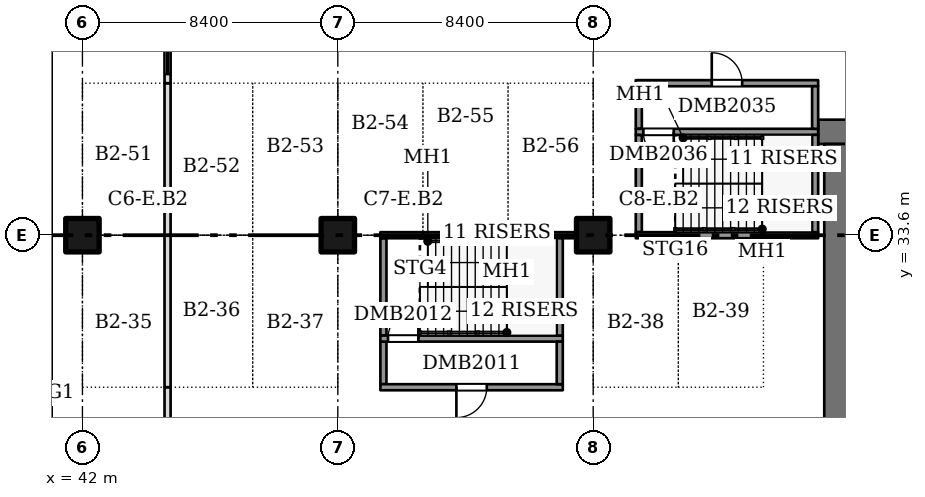
"""IFC4 building model, lengths in metres.
Left out: names, types, materials, properties, quantities, classifications, styles, units other than length and angle.
Written with IfcOpenShell. Run it as: python <this file> out.ifc"""

import sys

from ifc_helpers import new_model, si_unit, direction, frame, frame_2d, origin, origin_2d, place, context, subcontext, project, spatial, rectangle, extrude, element, fill, save


model = new_model("IFC4")
c1 = context("Model", 3, precision=1e-05, world=origin(), true_north=direction((0.0, 1.0)))
c2 = subcontext(c1, "Body", "Model", "MODEL_VIEW")
j1 = project(units=[si_unit("LENGTHUNIT", "METRE"), si_unit("PLANEANGLEUNIT", "RADIAN")], contexts=[c1])
p1 = place(None, origin())
s1 = spatial("IfcSite", under=j1, at=p1, CompositionType="ELEMENT")
p2 = place(p1, origin())
s2 = spatial("IfcBuilding", under=s1, at=p2, CompositionType="ELEMENT")
p3 = place(p2, frame((0.0, 0.0, -8.0)))
s3 = spatial("IfcBuildingStorey", under=s2, at=p3, CompositionType="ELEMENT", Elevation=-8.0)
p4 = place(p3, frame((66.2, 37.0, 0.0), z_axis=(0.0, 0.0, 1.0), x_axis=(1.0, 0.0, 0.0)))
e1 = element("IfcWall", 1, at=p4, inside=s3, PredefinedType="SOLIDWALL", context=c2, shape_type="SweptSolid", body=[
    extrude(rectangle(XDim=60.2, YDim=0.8, at=frame_2d((30.1, 0.0))), origin(), (0.0, 0.0, 1.0), 3.7),
])
p5 = place(p3, frame((66.8, 0.4, 0.0), z_axis=(0.0, 0.0, 1.0), x_axis=(0.0, 1.0, 0.0)))
e2 = element("IfcWall", 2, at=p5, inside=s3, PredefinedType="SOLIDWALL", context=c2, shape_type="SweptSolid", body=[
    extrude(rectangle(XDim=36.2, YDim=0.8, at=frame_2d((18.1, 0.0))), origin(), (0.0, 0.0, 1.0), 3.7),
])
for number, where, z_axis, x_axis in (
    (3, (42.0, 33.6, 0.0), (0.0, 0.0, 1.0), (1.0, 0.0, 0.0)),
    (4, (50.4, 33.6, 0.0), (0.0, 0.0, 1.0), (1.0, 0.0, 0.0)),
    (5, (58.8, 33.6, 0.0), (0.0, 0.0, 1.0), (1.0, 0.0, 0.0)),
):
    element("IfcColumn", number, at=place(p3, frame(where, z_axis=z_axis, x_axis=x_axis)), inside=s3, PredefinedType="COLUMN", context=c2, shape_type="SweptSolid", body=[
        extrude(rectangle(XDim=1.1, YDim=1.1, at=origin_2d()), origin(), (0.0, 0.0, 1.0), 3.7),
    ])
p6 = place(p3, frame((51.9, 28.7, 0.0), z_axis=(0.0, 0.0, 1.0), x_axis=(0.0, 1.0, 0.0)))
e6 = element("IfcWall", 6, at=p6, inside=s3, PredefinedType="SOLIDWALL", context=c2, shape_type="SweptSolid", body=[
    extrude(rectangle(XDim=1.4, YDim=0.2, at=frame_2d((0.7, 0.0))), origin(), (0.0, 0.0, 1.0), 3.7),
])
p7 = place(p3, frame((51.8, 28.6, 0.0), z_axis=(0.0, 0.0, 1.0), x_axis=(1.0, 0.0, 0.0)))
e7 = element("IfcWall", 7, at=p7, inside=s3, PredefinedType="SOLIDWALL", context=c2, shape_type="SweptSolid", body=[
    extrude(rectangle(XDim=6.0, YDim=0.2, at=frame_2d((3.0, 0.0))), origin(), (0.0, 0.0, 1.0), 3.7),
])
p8 = place(p7, frame((2.5, 0.0, 0.0)))
e8 = element("IfcOpeningElement", 8, at=p8, cuts=e7, PredefinedType="OPENING", context=c2, shape_type="SweptSolid", body=[
    extrude(rectangle(XDim=1.0, YDim=2.1, at=frame_2d((0.5, 1.05))), frame((0.0, 0.11, 0.0), z_axis=(0.0, -1.0, 0.0), x_axis=(1.0, 0.0, 0.0)), (0.0, 0.0, 1.0), 0.22),
])
p9 = place(p3, frame((51.9, 30.3, 0.0), z_axis=(0.0, 0.0, 1.0), x_axis=(0.0, 1.0, 0.0)))
e9 = element("IfcWall", 9, at=p9, inside=s3, PredefinedType="SOLIDWALL", context=c2, shape_type="SweptSolid", body=[
    extrude(rectangle(XDim=3.2, YDim=0.2, at=frame_2d((1.6, 0.0))), origin(), (0.0, 0.0, 1.0), 3.7),
])
p10 = place(p3, frame((51.8, 30.2, 0.0), z_axis=(0.0, 0.0, 1.0), x_axis=(1.0, 0.0, 0.0)))
e10 = element("IfcWall", 10, at=p10, inside=s3, PredefinedType="SOLIDWALL", context=c2, shape_type="SweptSolid", body=[
    extrude(rectangle(XDim=6.0, YDim=0.2, at=frame_2d((3.0, 0.0))), origin(), (0.0, 0.0, 1.0), 3.7),
])
p11 = place(p10, frame((0.25, 0.0, 0.0)))
e11 = element("IfcOpeningElement", 11, at=p11, cuts=e10, PredefinedType="OPENING", context=c2, shape_type="SweptSolid", body=[
    extrude(rectangle(XDim=1.0, YDim=2.1, at=frame_2d((0.5, 1.05))), frame((0.0, 0.11, 0.0), z_axis=(0.0, -1.0, 0.0), x_axis=(1.0, 0.0, 0.0)), (0.0, 0.0, 1.0), 0.22),
])
p12 = place(p3, frame((51.8, 33.6, 0.0), z_axis=(0.0, 0.0, 1.0), x_axis=(1.0, 0.0, 0.0)))
e12 = element("IfcWall", 12, at=p12, inside=s3, PredefinedType="SOLIDWALL", context=c2, shape_type="SweptSolid", body=[
    extrude(rectangle(XDim=1.4, YDim=0.2, at=frame_2d((0.7, 0.0))), origin(), (0.0, 0.0, 1.0), 3.7),
])
p13 = place(p3, frame((53.2, 33.6, 0.0), z_axis=(0.0, 0.0, 1.0), x_axis=(1.0, 0.0, 0.0)))
e13 = element("IfcWall", 13, at=p13, inside=s3, PredefinedType="SOLIDWALL", context=c2, shape_type="SweptSolid", body=[
    extrude(rectangle(XDim=2.8, YDim=0.2, at=frame_2d((1.4, 0.0))), origin(), (0.0, 0.0, 1.0), 3.7),
])
p14 = place(p3, frame((56.0, 33.6, 0.0), z_axis=(0.0, 0.0, 1.0), x_axis=(1.0, 0.0, 0.0)))
e14 = element("IfcWall", 14, at=p14, inside=s3, PredefinedType="SOLIDWALL", context=c2, shape_type="SweptSolid", body=[
    extrude(rectangle(XDim=2.25, YDim=0.2, at=frame_2d((1.125, 0.0))), origin(), (0.0, 0.0, 1.0), 3.7),
])
p15 = place(p3, frame((57.7, 28.7, 0.0), z_axis=(0.0, 0.0, 1.0), x_axis=(0.0, 1.0, 0.0)))
e15 = element("IfcWall", 15, at=p15, inside=s3, PredefinedType="SOLIDWALL", context=c2, shape_type="SweptSolid", body=[
    extrude(rectangle(XDim=1.4, YDim=0.2, at=frame_2d((0.7, 0.0))), origin(), (0.0, 0.0, 1.0), 3.7),
])
for number, where, z_axis, x_axis in (
    (16, (57.7, 30.3, 0.0), (0.0, 0.0, 1.0), (0.0, 1.0, 0.0)),
    (17, (60.3, 33.7, 0.0), (0.0, 0.0, 1.0), (0.0, 1.0, 0.0)),
):
    element("IfcWall", number, at=place(p3, frame(where, z_axis=z_axis, x_axis=x_axis)), inside=s3, PredefinedType="SOLIDWALL", context=c2, shape_type="SweptSolid", body=[
        extrude(rectangle(XDim=3.2, YDim=0.2, at=frame_2d((1.6, 0.0))), origin(), (0.0, 0.0, 1.0), 3.7),
    ])
p16 = place(p3, frame((60.2, 33.6, 0.0), z_axis=(0.0, 0.0, 1.0), x_axis=(1.0, 0.0, 0.0)))
e18 = element("IfcWall", 18, at=p16, inside=s3, PredefinedType="SOLIDWALL", context=c2, shape_type="SweptSolid", body=[
    extrude(rectangle(XDim=1.4, YDim=0.2, at=frame_2d((0.7, 0.0))), origin(), (0.0, 0.0, 1.0), 3.7),
])
p17 = place(p3, frame((60.3, 37.1, 0.0), z_axis=(0.0, 0.0, 1.0), x_axis=(0.0, 1.0, 0.0)))
e19 = element("IfcWall", 19, at=p17, inside=s3, PredefinedType="SOLIDWALL", context=c2, shape_type="SweptSolid", body=[
    extrude(rectangle(XDim=1.4, YDim=0.2, at=frame_2d((0.7, 0.0))), origin(), (0.0, 0.0, 1.0), 3.7),
])
p18 = place(p3, frame((60.2, 37.0, 0.0), z_axis=(0.0, 0.0, 1.0), x_axis=(1.0, 0.0, 0.0)))
e20 = element("IfcWall", 20, at=p18, inside=s3, PredefinedType="SOLIDWALL", context=c2, shape_type="SweptSolid", body=[
    extrude(rectangle(XDim=6.0, YDim=0.2, at=frame_2d((3.0, 0.0))), origin(), (0.0, 0.0, 1.0), 3.7),
])
p19 = place(p18, frame((0.25, 0.0, 0.0)))
e21 = element("IfcOpeningElement", 21, at=p19, cuts=e20, PredefinedType="OPENING", context=c2, shape_type="SweptSolid", body=[
    extrude(rectangle(XDim=1.0, YDim=2.1, at=frame_2d((0.5, 1.05))), frame((0.0, 0.11, 0.0), z_axis=(0.0, -1.0, 0.0), x_axis=(1.0, 0.0, 0.0)), (0.0, 0.0, 1.0), 0.22),
])
p20 = place(p3, frame((60.2, 38.6, 0.0), z_axis=(0.0, 0.0, 1.0), x_axis=(1.0, 0.0, 0.0)))
e22 = element("IfcWall", 22, at=p20, inside=s3, PredefinedType="SOLIDWALL", context=c2, shape_type="SweptSolid", body=[
    extrude(rectangle(XDim=6.0, YDim=0.2, at=frame_2d((3.0, 0.0))), origin(), (0.0, 0.0, 1.0), 3.7),
])
p21 = place(p20, frame((2.5, 0.0, 0.0)))
e23 = element("IfcOpeningElement", 23, at=p21, cuts=e22, PredefinedType="OPENING", context=c2, shape_type="SweptSolid", body=[
    extrude(rectangle(XDim=1.0, YDim=2.1, at=frame_2d((0.5, 1.05))), frame((0.0, 0.11, 0.0), z_axis=(0.0, -1.0, 0.0), x_axis=(1.0, 0.0, 0.0)), (0.0, 0.0, 1.0), 0.22),
])
p22 = place(p3, frame((61.6, 33.6, 0.0), z_axis=(0.0, 0.0, 1.0), x_axis=(1.0, 0.0, 0.0)))
e24 = element("IfcWall", 24, at=p22, inside=s3, PredefinedType="SOLIDWALL", context=c2, shape_type="SweptSolid", body=[
    extrude(rectangle(XDim=2.8, YDim=0.2, at=frame_2d((1.4, 0.0))), origin(), (0.0, 0.0, 1.0), 3.7),
])
p23 = place(p3, frame((64.4, 33.6, 0.0), z_axis=(0.0, 0.0, 1.0), x_axis=(1.0, 0.0, 0.0)))
e25 = element("IfcWall", 25, at=p23, inside=s3, PredefinedType="SOLIDWALL", context=c2, shape_type="SweptSolid", body=[
    extrude(rectangle(XDim=1.8, YDim=0.2, at=frame_2d((0.9, 0.0))), origin(), (0.0, 0.0, 1.0), 3.7),
])
p24 = place(p3, frame((66.1, 33.7, 0.0), z_axis=(0.0, 0.0, 1.0), x_axis=(0.0, 1.0, 0.0)))
e26 = element("IfcWall", 26, at=p24, inside=s3, PredefinedType="SOLIDWALL", context=c2, shape_type="SweptSolid", body=[
    extrude(rectangle(XDim=3.2, YDim=0.2, at=frame_2d((1.6, 0.0))), origin(), (0.0, 0.0, 1.0), 3.7),
])
p25 = place(p3, frame((66.1, 37.1, 0.0), z_axis=(0.0, 0.0, 1.0), x_axis=(0.0, 1.0, 0.0)))
e27 = element("IfcWall", 27, at=p25, inside=s3, PredefinedType="SOLIDWALL", context=c2, shape_type="SweptSolid", body=[
    extrude(rectangle(XDim=1.4, YDim=0.2, at=frame_2d((0.7, 0.0))), origin(), (0.0, 0.0, 1.0), 3.7),
])
p26 = place(p3, frame((44.8, 25.2, 0.0), z_axis=(0.0, 0.0, 1.0), x_axis=(0.0, 1.0, 0.0)))
e28 = element("IfcWall", 28, at=p26, inside=s3, PredefinedType="PARTITIONING", context=c2, shape_type="SweptSolid", body=[
    extrude(rectangle(XDim=3.4, YDim=0.2, at=frame_2d((1.7, 0.0))), origin(), (0.0, 0.0, 1.0), 3.7),
])
p27 = place(p3, frame((44.8, 28.6, 0.0), z_axis=(0.0, 0.0, 1.0), x_axis=(0.0, 1.0, 0.0)))
e29 = element("IfcWall", 29, at=p27, inside=s3, PredefinedType="PARTITIONING", context=c2, shape_type="SweptSolid", body=[
    extrude(rectangle(XDim=10.0, YDim=0.2, at=frame_2d((5.0, 0.0))), origin(), (0.0, 0.0, 1.0), 3.7),
])
p28 = place(p3, frame((44.8, 38.6, 0.0), z_axis=(0.0, 0.0, 1.0), x_axis=(0.0, 1.0, 0.0)))
e30 = element("IfcWall", 30, at=p28, inside=s3, PredefinedType="PARTITIONING", context=c2, shape_type="SweptSolid", body=[
    extrude(rectangle(XDim=6.8, YDim=0.2, at=frame_2d((3.4, 0.0))), origin(), (0.0, 0.0, 1.0), 3.7),
])
p29 = place(p28, frame((0.3, 0.0, 0.0)))
e31 = element("IfcOpeningElement", 31, at=p29, cuts=e30, PredefinedType="OPENING", context=c2, shape_type="SweptSolid", body=[
    extrude(rectangle(XDim=4.8, YDim=2.4, at=frame_2d((2.4, 1.2))), frame((0.0, 0.11, 0.0), z_axis=(0.0, -1.0, 0.0), x_axis=(1.0, 0.0, 0.0)), (0.0, 0.0, 1.0), 0.22),
])
p30 = place(p28, frame((5.4, 0.0, 0.0)))
e32 = element("IfcOpeningElement", 32, at=p30, cuts=e30, PredefinedType="OPENING", context=c2, shape_type="SweptSolid", body=[
    extrude(rectangle(XDim=1.0, YDim=2.1, at=frame_2d((0.5, 1.05))), frame((0.0, 0.11, 0.0), z_axis=(0.0, -1.0, 0.0), x_axis=(1.0, 0.0, 0.0)), (0.0, 0.0, 1.0), 0.22),
])
p31 = place(p8, frame((1.0, 0.0, 0.0), z_axis=(0.0, 0.0, 1.0), x_axis=(-1.0, 0.0, 0.0)))
e33 = element("IfcDoor", 33, at=p31, inside=s3, OperationType="SINGLE_SWING_RIGHT", PredefinedType="DOOR", context=c2, shape_type="SweptSolid", body=[
    extrude(rectangle(XDim=1.0, YDim=2.1, at=frame_2d((0.5, 1.05))), frame((0.0, 0.025, 0.0), z_axis=(0.0, -1.0, 0.0), x_axis=(1.0, 0.0, 0.0)), (0.0, 0.0, 1.0), 0.05),
])
fill(e8, e33)
p32 = place(p11, origin())
e34 = element("IfcDoor", 34, at=p32, inside=s3, OperationType="SINGLE_SWING_RIGHT", PredefinedType="DOOR", context=c2, shape_type="SweptSolid", body=[
    extrude(rectangle(XDim=1.0, YDim=2.1, at=frame_2d((0.5, 1.05))), frame((0.0, 0.025, 0.0), z_axis=(0.0, -1.0, 0.0), x_axis=(1.0, 0.0, 0.0)), (0.0, 0.0, 1.0), 0.05),
])
fill(e11, e34)
p33 = place(p21, origin())
e35 = element("IfcDoor", 35, at=p33, inside=s3, OperationType="SINGLE_SWING_LEFT", PredefinedType="DOOR", context=c2, shape_type="SweptSolid", body=[
    extrude(rectangle(XDim=1.0, YDim=2.1, at=frame_2d((0.5, 1.05))), frame((0.0, 0.025, 0.0), z_axis=(0.0, -1.0, 0.0), x_axis=(1.0, 0.0, 0.0)), (0.0, 0.0, 1.0), 0.05),
])
fill(e23, e35)
p34 = place(p19, frame((1.0, 0.0, 0.0), z_axis=(0.0, 0.0, 1.0), x_axis=(-1.0, 0.0, 0.0)))
e36 = element("IfcDoor", 36, at=p34, inside=s3, OperationType="SINGLE_SWING_LEFT", PredefinedType="DOOR", context=c2, shape_type="SweptSolid", body=[
    extrude(rectangle(XDim=1.0, YDim=2.1, at=frame_2d((0.5, 1.05))), frame((0.0, 0.025, 0.0), z_axis=(0.0, -1.0, 0.0), x_axis=(1.0, 0.0, 0.0)), (0.0, 0.0, 1.0), 0.05),
])
fill(e21, e36)
p35 = place(p29, origin())
e37 = element("IfcDoor", 37, at=p35, inside=s3, OperationType="ROLLINGUP", PredefinedType="GATE", context=c2, shape_type="SweptSolid", body=[
    extrude(rectangle(XDim=4.8, YDim=2.4, at=frame_2d((2.4, 1.2))), frame((0.0, 0.025, 0.0), z_axis=(0.0, -1.0, 0.0), x_axis=(1.0, 0.0, 0.0)), (0.0, 0.0, 1.0), 0.05),
])
fill(e31, e37)
save(model, sys.argv[1])
